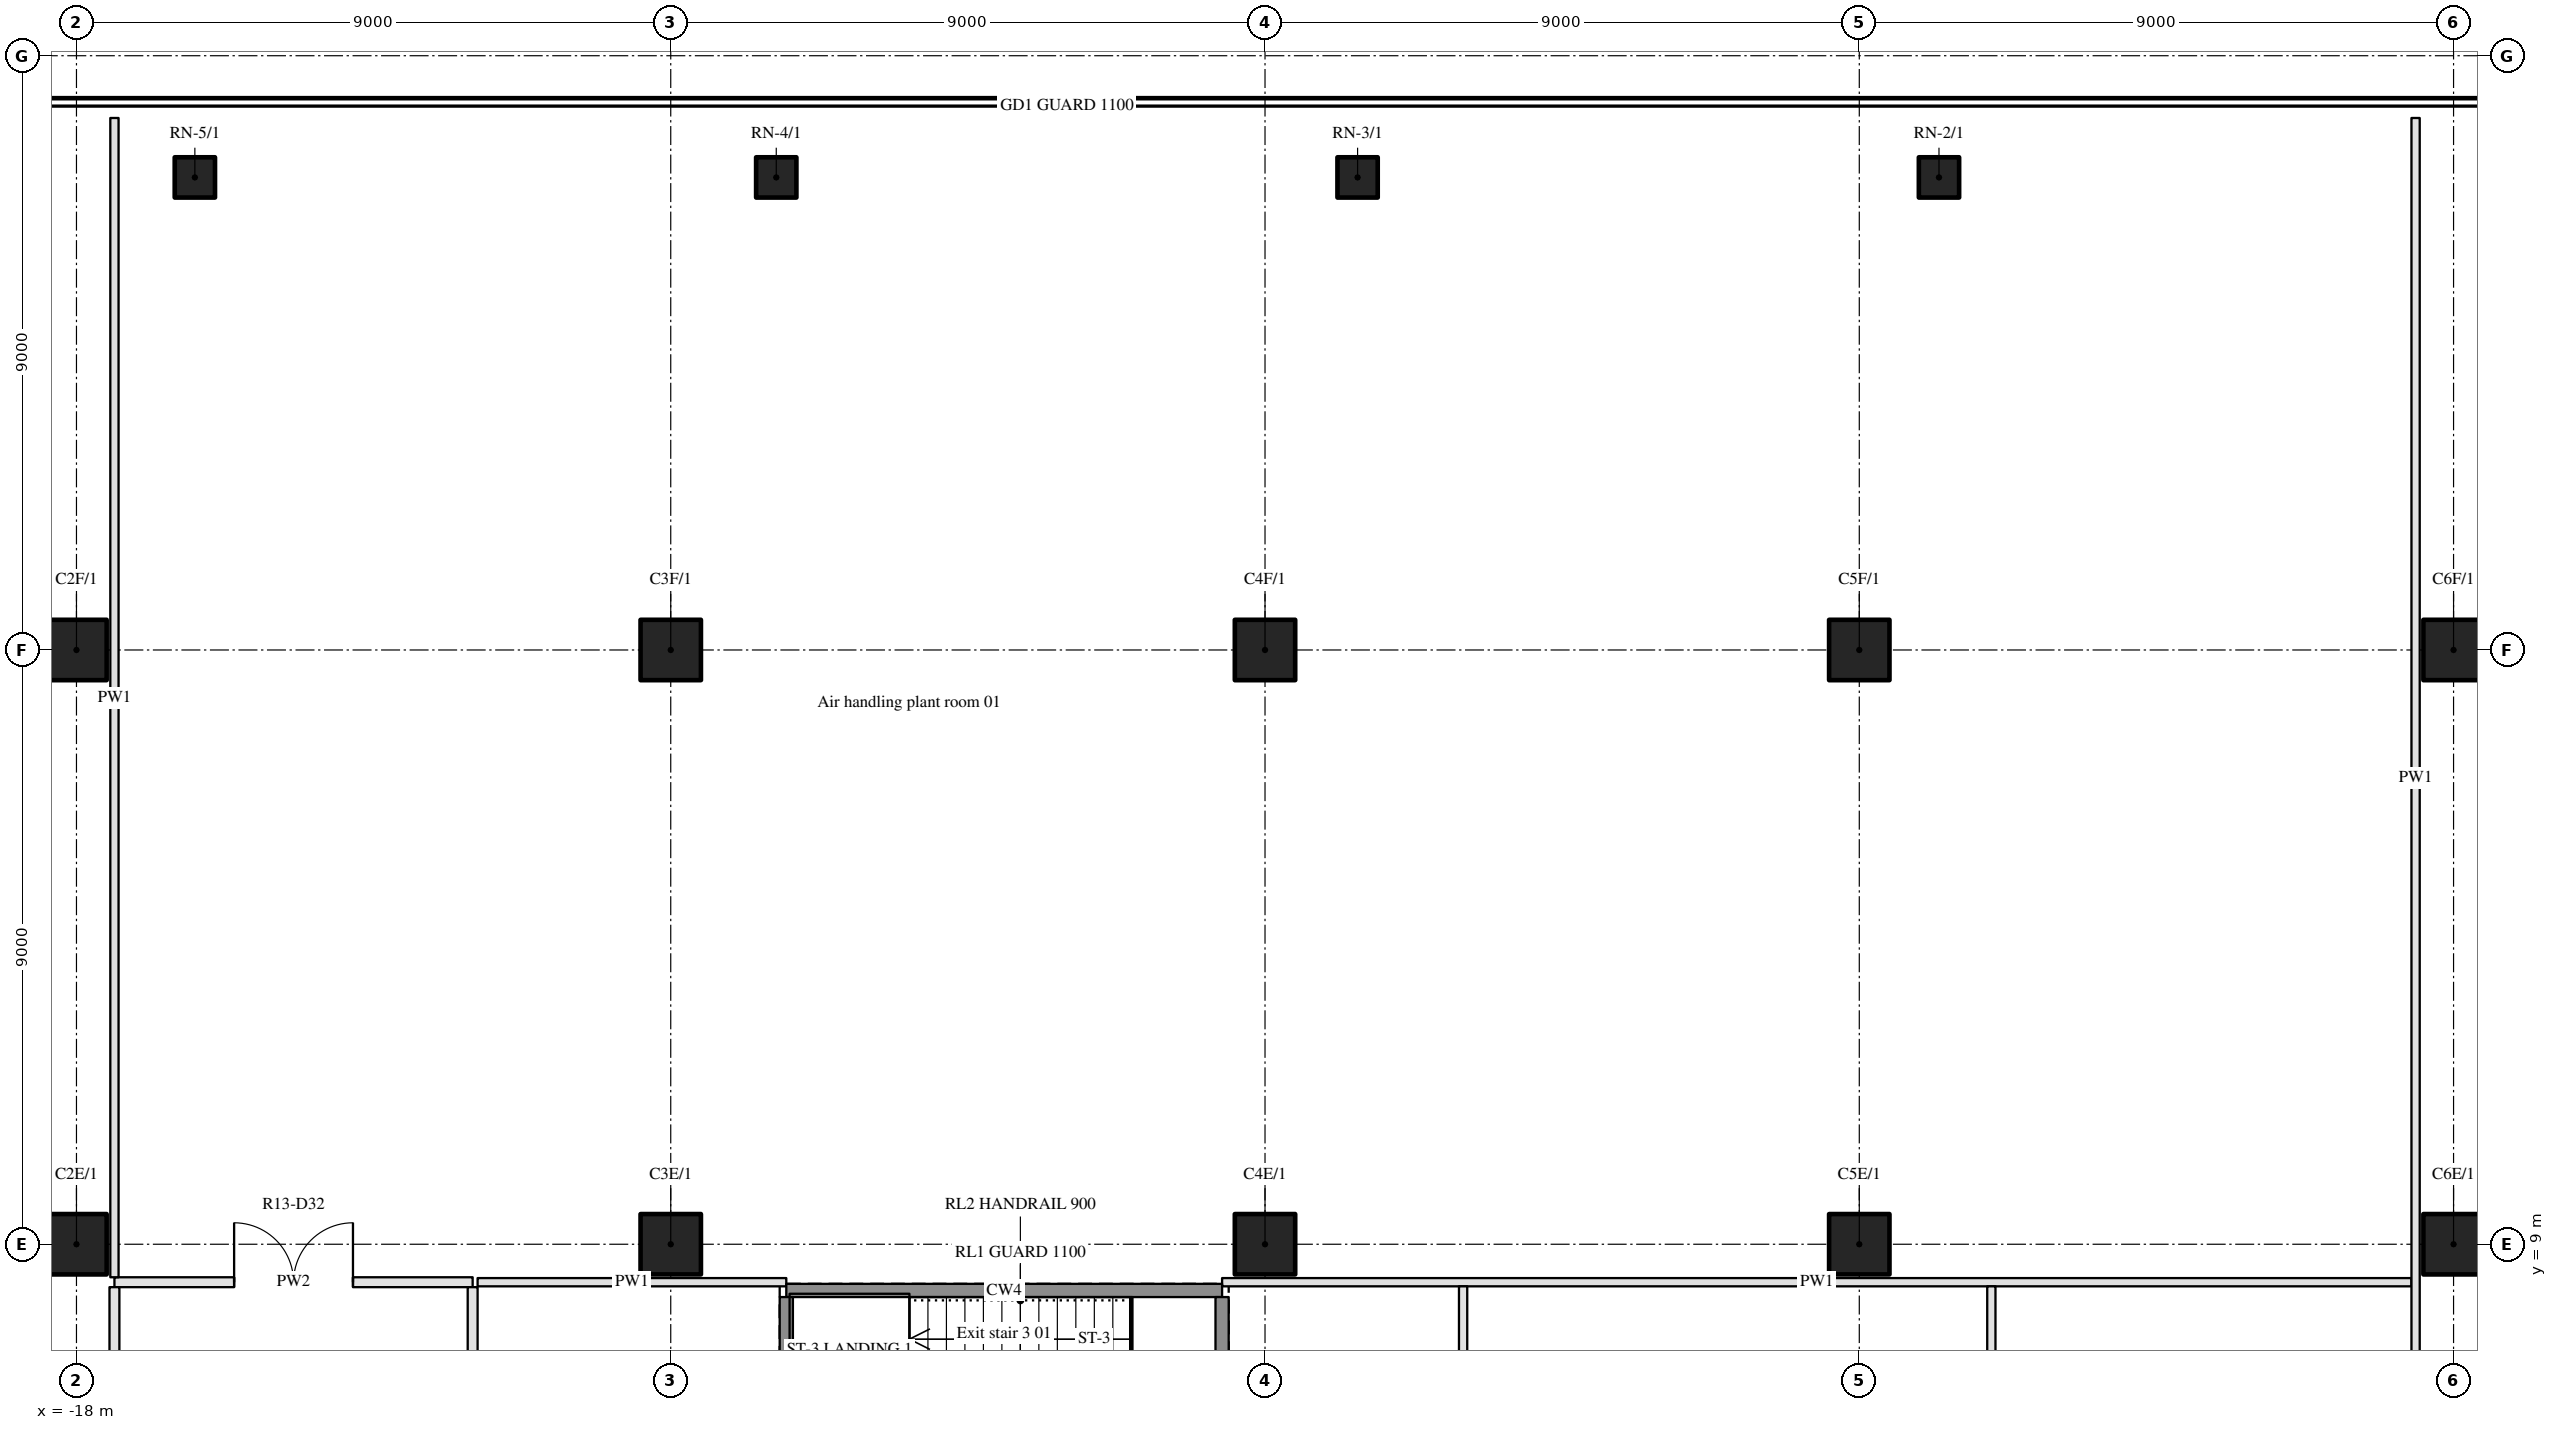
"""IFC4 building model, lengths in metres.
Left out: names, types, materials, properties, quantities, classifications, styles, units other than length and angle.
Written with IfcOpenShell. Run it as: python <this file> out.ifc"""

import sys

from ifc_helpers import new_model, si_unit, direction, frame, frame_2d, origin, origin_2d, place, context, subcontext, project, spatial, rectangle, hollow_circle, extrude, element, fill, save


model = new_model("IFC4")
c1 = context("Model", 3, precision=1e-05, world=origin(), true_north=direction((0.0, 1.0)))
c2 = subcontext(c1, "Body", "Model", "MODEL_VIEW")
j1 = project(units=[si_unit("LENGTHUNIT", "METRE"), si_unit("PLANEANGLEUNIT", "RADIAN")], contexts=[c1])
p1 = place(None, origin())
s1 = spatial("IfcSite", under=j1, at=p1, CompositionType="ELEMENT")
p2 = place(p1, origin())
s2 = spatial("IfcBuilding", under=s1, at=p2, CompositionType="ELEMENT")
p3 = place(p2, frame((0.0, 0.0, 57.6)))
s3 = spatial("IfcBuildingStorey", under=s2, at=p3, CompositionType="ELEMENT", Elevation=57.6)
p4 = place(p3, frame((-18.0, 9.0, 0.0), z_axis=(0.0, 0.0, 1.0), x_axis=(1.0, 0.0, 0.0)))
e1 = element("IfcColumn", 1, at=p4, inside=s3, PredefinedType="COLUMN", context=c2, shape_type="SweptSolid", body=[
    extrude(hollow_circle(Radius=0.457, WallThickness=0.05, at=origin_2d()), origin(), (0.0, 0.0, 1.0), 4.5),
])
p5 = place(p3, frame((-18.0, 18.0, 0.0), z_axis=(0.0, 0.0, 1.0), x_axis=(1.0, 0.0, 0.0)))
e2 = element("IfcColumn", 2, at=p5, inside=s3, PredefinedType="COLUMN", context=c2, shape_type="SweptSolid", body=[
    extrude(hollow_circle(Radius=0.457, WallThickness=0.05, at=origin_2d()), origin(), (0.0, 0.0, 1.0), 4.08),
])
for number, where, z_axis, x_axis in (
    (3, (-9.0, 9.0, 0.0), (0.0, 0.0, 1.0), (1.0, 0.0, 0.0)),
    (4, (-9.0, 18.0, 0.0), (0.0, 0.0, 1.0), (1.0, 0.0, 0.0)),
    (5, (0.0, 9.0, 0.0), (0.0, 0.0, 1.0), (1.0, 0.0, 0.0)),
    (6, (0.0, 18.0, 0.0), (0.0, 0.0, 1.0), (1.0, 0.0, 0.0)),
    (7, (9.0, 9.0, 0.0), (0.0, 0.0, 1.0), (1.0, 0.0, 0.0)),
    (8, (9.0, 18.0, 0.0), (0.0, 0.0, 1.0), (1.0, 0.0, 0.0)),
    (9, (18.0, 9.0, 0.0), (0.0, 0.0, 1.0), (1.0, 0.0, 0.0)),
    (10, (18.0, 18.0, 0.0), (0.0, 0.0, 1.0), (1.0, 0.0, 0.0)),
):
    element("IfcColumn", number, at=place(p3, frame(where, z_axis=z_axis, x_axis=x_axis)), inside=s3, PredefinedType="COLUMN", context=c2, shape_type="SweptSolid", body=[
        extrude(hollow_circle(Radius=0.457, WallThickness=0.05, at=origin_2d()), origin(), (0.0, 0.0, 1.0), 4.5),
    ])
for number, where, z_axis, x_axis in (
    (11, (10.207, 25.157, 0.0), (0.0, 0.0, 1.0), (1.0, 0.0, 0.0)),
    (12, (1.402, 25.157, 0.0), (0.0, 0.0, 1.0), (1.0, 0.0, 0.0)),
    (13, (-7.402, 25.157, 0.0), (0.0, 0.0, 1.0), (1.0, 0.0, 0.0)),
    (14, (-16.207, 25.157, 0.0), (0.0, 0.0, 1.0), (1.0, 0.0, 0.0)),
):
    element("IfcColumn", number, at=place(p3, frame(where, z_axis=z_axis, x_axis=x_axis)), inside=s3, PredefinedType="COLUMN", context=c2, shape_type="SweptSolid", body=[
        extrude(hollow_circle(Radius=0.305, WallThickness=0.03, at=origin_2d()), origin(), (0.0, 0.0, 1.0), 4.08),
    ])
p6 = place(p3, frame((-7.25, 8.3, 0.0), z_axis=(0.0, 0.0, 1.0), x_axis=(1.0, 0.0, 0.0)))
e15 = element("IfcWall", 15, at=p6, inside=s3, PredefinedType="SHEAR", context=c2, shape_type="SweptSolid", body=[
    extrude(rectangle(XDim=6.6, YDim=0.2, at=frame_2d((3.3, 0.0))), origin(), (0.0, 0.0, 1.0), 4.5),
])
p7 = place(p3, frame((-17.425, 8.425, 0.0), z_axis=(0.0, 0.0, 1.0), x_axis=(1.0, 0.0, 0.0)))
e16 = element("IfcWall", 16, at=p7, inside=s3, PredefinedType="PARTITIONING", context=c2, shape_type="SweptSolid", body=[
    extrude(rectangle(XDim=5.425, YDim=0.15, at=frame_2d((2.712, 0.0))), origin(), (0.0, 0.0, 1.0), 3.56),
])
p8 = place(p7, frame((1.812, 0.0, 0.0)))
e17 = element("IfcOpeningElement", 17, at=p8, cuts=e16, PredefinedType="OPENING", context=c2, shape_type="SweptSolid", body=[
    extrude(rectangle(XDim=1.8, YDim=2.1, at=frame_2d((0.9, 1.05))), frame((0.0, 0.085, 0.0), z_axis=(0.0, -1.0, 0.0), x_axis=(1.0, 0.0, 0.0)), (0.0, 0.0, 1.0), 0.17),
])
p9 = place(p3, frame((-11.925, 8.425, 0.0), z_axis=(0.0, 0.0, 1.0), x_axis=(1.0, 0.0, 0.0)))
e18 = element("IfcWall", 18, at=p9, inside=s3, PredefinedType="PARTITIONING", context=c2, shape_type="SweptSolid", body=[
    extrude(rectangle(XDim=4.675, YDim=0.125, at=frame_2d((2.337, 0.0))), origin(), (0.0, 0.0, 1.0), 3.56),
])
p10 = place(p3, frame((-0.65, 8.425, 0.0), z_axis=(0.0, 0.0, 1.0), x_axis=(1.0, 0.0, 0.0)))
e19 = element("IfcWall", 19, at=p10, inside=s3, PredefinedType="PARTITIONING", context=c2, shape_type="SweptSolid", body=[
    extrude(rectangle(XDim=18.012, YDim=0.125, at=frame_2d((9.006, 0.0))), origin(), (0.0, 0.0, 1.0), 3.56),
])
p11 = place(p3, frame((-17.425, 8.35, 0.0), z_axis=(0.0, 0.0, 1.0), x_axis=(0.0, -1.0, 0.0)))
e20 = element("IfcWall", 20, at=p11, inside=s3, PredefinedType="PARTITIONING", context=c2, shape_type="SweptSolid", body=[
    extrude(rectangle(XDim=23.275, YDim=0.15, at=frame_2d((11.638, 0.0))), origin(), (0.0, 0.0, 1.0), 3.56),
])
p12 = place(p11, frame((19.413, 0.0, 0.0)))
e21 = element("IfcOpeningElement", 21, at=p12, cuts=e20, PredefinedType="OPENING", context=c2, shape_type="SweptSolid", body=[
    extrude(rectangle(XDim=1.8, YDim=2.1, at=frame_2d((0.9, 1.05))), frame((0.0, 0.085, 0.0), z_axis=(0.0, -1.0, 0.0), x_axis=(1.0, 0.0, 0.0)), (0.0, 0.0, 1.0), 0.17),
])
p13 = place(p11, frame((11.05, 0.0, 0.0)))
e22 = element("IfcOpeningElement", 22, at=p13, cuts=e20, PredefinedType="OPENING", context=c2, shape_type="SweptSolid", body=[
    extrude(rectangle(XDim=1.8, YDim=2.1, at=frame_2d((0.9, 1.05))), frame((0.0, 0.085, 0.0), z_axis=(0.0, -1.0, 0.0), x_axis=(1.0, 0.0, 0.0)), (0.0, 0.0, 1.0), 0.17),
])
p14 = place(p11, frame((6.0, 0.0, 0.0)))
e23 = element("IfcOpeningElement", 23, at=p14, cuts=e20, PredefinedType="OPENING", context=c2, shape_type="SweptSolid", body=[
    extrude(rectangle(XDim=1.8, YDim=2.1, at=frame_2d((0.9, 1.05))), frame((0.0, 0.085, 0.0), z_axis=(0.0, -1.0, 0.0), x_axis=(1.0, 0.0, 0.0)), (0.0, 0.0, 1.0), 0.17),
])
p15 = place(p3, frame((-17.425, 8.5, 0.0), z_axis=(0.0, 0.0, 1.0), x_axis=(0.0, 1.0, 0.0)))
e24 = element("IfcWall", 24, at=p15, inside=s3, PredefinedType="PARTITIONING", context=c2, shape_type="SweptSolid", body=[
    extrude(rectangle(XDim=17.557, YDim=0.125, at=frame_2d((8.778, 0.0))), origin(), (0.0, 0.0, 1.0), 3.56),
])
p16 = place(p3, frame((-12.0, 6.075, 0.0), z_axis=(0.0, 0.0, 1.0), x_axis=(0.0, 1.0, 0.0)))
e25 = element("IfcWall", 25, at=p16, inside=s3, PredefinedType="PARTITIONING", context=c2, shape_type="SweptSolid", body=[
    extrude(rectangle(XDim=2.275, YDim=0.15, at=frame_2d((1.138, 0.0))), origin(), (0.0, 0.0, 1.0), 3.56),
])
for number, where, z_axis, x_axis in (
    (26, (-7.25, 5.5, 0.0), (0.0, 0.0, 1.0), (0.0, 1.0, 0.0)),
    (27, (-0.65, 5.5, 0.0), (0.0, 0.0, 1.0), (0.0, 1.0, 0.0)),
):
    element("IfcWall", number, at=place(p3, frame(where, z_axis=z_axis, x_axis=x_axis)), inside=s3, PredefinedType="SHEAR", context=c2, shape_type="SweptSolid", body=[
        extrude(rectangle(XDim=2.7, YDim=0.2, at=frame_2d((1.35, 0.0))), origin(), (0.0, 0.0, 1.0), 4.5),
    ])
for number, where, z_axis, x_axis in (
    (28, (3.0, 6.075, 0.0), (0.0, 0.0, 1.0), (0.0, 1.0, 0.0)),
    (29, (11.0, 6.075, 0.0), (0.0, 0.0, 1.0), (0.0, 1.0, 0.0)),
):
    element("IfcWall", number, at=place(p3, frame(where, z_axis=z_axis, x_axis=x_axis)), inside=s3, PredefinedType="PARTITIONING", context=c2, shape_type="SweptSolid", body=[
        extrude(rectangle(XDim=2.288, YDim=0.125, at=frame_2d((1.144, 0.0))), origin(), (0.0, 0.0, 1.0), 3.56),
    ])
p17 = place(p3, frame((17.425, 6.075, 0.0), z_axis=(0.0, 0.0, 1.0), x_axis=(0.0, 1.0, 0.0)))
e30 = element("IfcWall", 30, at=p17, inside=s3, PredefinedType="PARTITIONING", context=c2, shape_type="SweptSolid", body=[
    extrude(rectangle(XDim=19.982, YDim=0.125, at=frame_2d((9.991, 0.0))), origin(), (0.0, 0.0, 1.0), 3.56),
])
p18 = place(p8, origin())
e31 = element("IfcDoor", 31, at=p18, inside=s3, OperationType="DOUBLE_DOOR_SINGLE_SWING", PredefinedType="DOOR", context=c2, shape_type="SweptSolid", body=[
    extrude(rectangle(XDim=1.8, YDim=2.1, at=frame_2d((0.9, 1.05))), frame((0.0, 0.025, 0.0), z_axis=(0.0, -1.0, 0.0), x_axis=(1.0, 0.0, 0.0)), (0.0, 0.0, 1.0), 0.05),
])
fill(e17, e31)
save(model, sys.argv[1])
